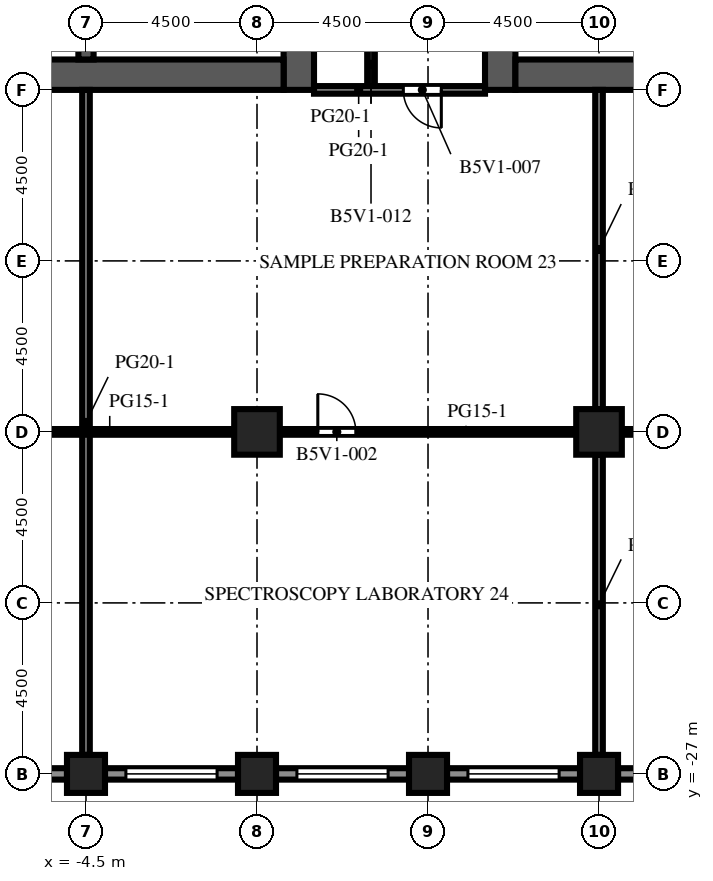
"""IFC4 building model, lengths in metres.
Left out: names, types, materials, properties, quantities, classifications, styles, units other than length and angle.
Written with IfcOpenShell. Run it as: python <this file> out.ifc"""

import sys

from ifc_helpers import new_model, si_unit, direction, frame, frame_2d, origin, origin_2d, place, context, subcontext, project, spatial, rectangle, extrude, element, fill, save


model = new_model("IFC4")
c1 = context("Model", 3, precision=1e-05, world=origin(), true_north=direction((0.0, 1.0)))
c2 = subcontext(c1, "Body", "Model", "MODEL_VIEW")
j1 = project(units=[si_unit("LENGTHUNIT", "METRE"), si_unit("PLANEANGLEUNIT", "RADIAN")], contexts=[c1])
p1 = place(None, origin())
s1 = spatial("IfcSite", under=j1, at=p1, CompositionType="ELEMENT")
p2 = place(p1, origin())
s2 = spatial("IfcBuilding", under=s1, at=p2, CompositionType="ELEMENT")
p3 = place(p2, frame((0.0, 0.0, 173.2)))
s3 = spatial("IfcBuildingStorey", under=s2, at=p3, CompositionType="ELEMENT", Elevation=173.2)
for number, where, z_axis, x_axis in (
    (1, (-4.5, -27.0, 0.0), (0.0, 0.0, 1.0), (1.0, 0.0, 0.0)),
    (2, (0.0, -27.0, 0.0), (0.0, 0.0, 1.0), (1.0, 0.0, 0.0)),
    (3, (4.5, -27.0, 0.0), (0.0, 0.0, 1.0), (1.0, 0.0, 0.0)),
    (4, (9.0, -27.0, 0.0), (0.0, 0.0, 1.0), (1.0, 0.0, 0.0)),
):
    element("IfcColumn", number, at=place(p3, frame(where, z_axis=z_axis, x_axis=x_axis)), inside=s3, PredefinedType="COLUMN", context=c2, shape_type="SweptSolid", body=[
        extrude(rectangle(XDim=1.0, YDim=1.0, at=origin_2d()), origin(), (0.0, 0.0, 1.0), 4.1),
    ])
for number, where, z_axis, x_axis in (
    (5, (0.0, -18.0, 0.0), (0.0, 0.0, 1.0), (1.0, 0.0, 0.0)),
    (6, (9.0, -18.0, 0.0), (0.0, 0.0, 1.0), (1.0, 0.0, 0.0)),
):
    element("IfcColumn", number, at=place(p3, frame(where, z_axis=z_axis, x_axis=x_axis)), inside=s3, PredefinedType="COLUMN", context=c2, shape_type="SweptSolid", body=[
        extrude(rectangle(XDim=1.2, YDim=1.2, at=origin_2d()), origin(), (0.0, 0.0, 1.0), 4.1),
    ])
p4 = place(p3, frame((1.1, -9.0, 0.0), z_axis=(0.0, 0.0, 1.0), x_axis=(0.0, 1.0, 0.0)))
e7 = element("IfcWall", 7, at=p4, inside=s3, PredefinedType="SHEAR", context=c2, shape_type="SweptSolid", body=[
    extrude(rectangle(XDim=27.5, YDim=0.8, at=frame_2d((13.75, 0.0))), origin(), (0.0, 0.0, 1.0), 4.1),
])
p5 = place(p4, frame((12.55, 0.0, 0.0)))
e8 = element("IfcOpeningElement", 8, at=p5, cuts=e7, PredefinedType="OPENING", context=c2, shape_type="SweptSolid", body=[
    extrude(rectangle(XDim=2.4, YDim=2.4, at=frame_2d((1.2, 1.2))), frame((0.0, 0.41, 0.0), z_axis=(0.0, -1.0, 0.0), x_axis=(1.0, 0.0, 0.0)), (0.0, 0.0, 1.0), 0.82),
])
p6 = place(p4, frame((3.95, 0.0, 0.0)))
e9 = element("IfcOpeningElement", 9, at=p6, cuts=e7, PredefinedType="OPENING", context=c2, shape_type="SweptSolid", body=[
    extrude(rectangle(XDim=1.2, YDim=2.1, at=frame_2d((0.6, 1.05))), frame((0.0, 0.41, 0.0), z_axis=(0.0, -1.0, 0.0), x_axis=(1.0, 0.0, 0.0)), (0.0, 0.0, 1.0), 0.82),
])
p7 = place(p4, frame((22.35, 0.0, 0.0)))
e10 = element("IfcOpeningElement", 10, at=p7, cuts=e7, PredefinedType="OPENING", context=c2, shape_type="SweptSolid", body=[
    extrude(rectangle(XDim=1.2, YDim=2.1, at=frame_2d((0.6, 1.05))), frame((0.0, 0.41, 0.0), z_axis=(0.0, -1.0, 0.0), x_axis=(1.0, 0.0, 0.0)), (0.0, 0.0, 1.0), 0.82),
])
p8 = place(p3, frame((-9.7, -8.6, 0.0), z_axis=(0.0, 0.0, 1.0), x_axis=(1.0, 0.0, 0.0)))
e11 = element("IfcWall", 11, at=p8, inside=s3, PredefinedType="SHEAR", context=c2, shape_type="SweptSolid", body=[
    extrude(rectangle(XDim=10.4, YDim=0.8, at=frame_2d((5.2, 0.0))), origin(), (0.0, 0.0, 1.0), 4.1),
])
p9 = place(p3, frame((-4.5, -8.2, 0.0), z_axis=(0.0, 0.0, 1.0), x_axis=(0.0, 1.0, 0.0)))
e12 = element("IfcWall", 12, at=p9, inside=s3, PredefinedType="SHEAR", context=c2, shape_type="SweptSolid", body=[
    extrude(rectangle(XDim=7.5, YDim=0.4, at=frame_2d((3.75, 0.0))), origin(), (0.0, 0.0, 1.0), 4.1),
])
p10 = place(p3, frame((6.4, -9.0, 0.0), z_axis=(0.0, 0.0, 1.0), x_axis=(0.0, 1.0, 0.0)))
e13 = element("IfcWall", 13, at=p10, inside=s3, PredefinedType="SHEAR", context=c2, shape_type="SweptSolid", body=[
    extrude(rectangle(XDim=27.5, YDim=0.8, at=frame_2d((13.75, 0.0))), origin(), (0.0, 0.0, 1.0), 4.1),
])
p11 = place(p10, frame((12.55, 0.0, 0.0)))
e14 = element("IfcOpeningElement", 14, at=p11, cuts=e13, PredefinedType="OPENING", context=c2, shape_type="SweptSolid", body=[
    extrude(rectangle(XDim=2.4, YDim=2.4, at=frame_2d((1.2, 1.2))), frame((0.0, 0.41, 0.0), z_axis=(0.0, -1.0, 0.0), x_axis=(1.0, 0.0, 0.0)), (0.0, 0.0, 1.0), 0.82),
])
p12 = place(p10, frame((3.95, 0.0, 0.0)))
e15 = element("IfcOpeningElement", 15, at=p12, cuts=e13, PredefinedType="OPENING", context=c2, shape_type="SweptSolid", body=[
    extrude(rectangle(XDim=1.2, YDim=2.1, at=frame_2d((0.6, 1.05))), frame((0.0, 0.41, 0.0), z_axis=(0.0, -1.0, 0.0), x_axis=(1.0, 0.0, 0.0)), (0.0, 0.0, 1.0), 0.82),
])
p13 = place(p10, frame((22.35, 0.0, 0.0)))
e16 = element("IfcOpeningElement", 16, at=p13, cuts=e13, PredefinedType="OPENING", context=c2, shape_type="SweptSolid", body=[
    extrude(rectangle(XDim=1.2, YDim=2.1, at=frame_2d((0.6, 1.05))), frame((0.0, 0.41, 0.0), z_axis=(0.0, -1.0, 0.0), x_axis=(1.0, 0.0, 0.0)), (0.0, 0.0, 1.0), 0.82),
])
p14 = place(p3, frame((6.8, -8.6, 0.0), z_axis=(0.0, 0.0, 1.0), x_axis=(1.0, 0.0, 0.0)))
e17 = element("IfcWall", 17, at=p14, inside=s3, PredefinedType="SHEAR", context=c2, shape_type="SweptSolid", body=[
    extrude(rectangle(XDim=10.4, YDim=0.8, at=frame_2d((5.2, 0.0))), origin(), (0.0, 0.0, 1.0), 4.1),
])
p15 = place(p3, frame((-5.0, -27.0, 0.0), z_axis=(0.0, 0.0, 1.0), x_axis=(-1.0, 0.0, 0.0)))
e18 = element("IfcWall", 18, at=p15, inside=s3, PredefinedType="SOLIDWALL", context=c2, shape_type="SweptSolid", body=[
    extrude(rectangle(XDim=3.5, YDim=0.3, at=frame_2d((1.75, 0.0))), origin(), (0.0, 0.0, 1.0), 2.85),
])
p16 = place(p15, frame((0.55, 0.0, 0.8)))
e19 = element("IfcOpeningElement", 19, at=p16, cuts=e18, PredefinedType="OPENING", context=c2, shape_type="SweptSolid", body=[
    extrude(rectangle(XDim=2.4, YDim=1.7, at=frame_2d((1.2, 0.85))), frame((0.0, 0.16, 0.0), z_axis=(0.0, -1.0, 0.0), x_axis=(1.0, 0.0, 0.0)), (0.0, 0.0, 1.0), 0.32),
])
p17 = place(p3, frame((-0.5, -27.0, 0.0), z_axis=(0.0, 0.0, 1.0), x_axis=(-1.0, 0.0, 0.0)))
e20 = element("IfcWall", 20, at=p17, inside=s3, PredefinedType="SOLIDWALL", context=c2, shape_type="SweptSolid", body=[
    extrude(rectangle(XDim=3.5, YDim=0.3, at=frame_2d((1.75, 0.0))), origin(), (0.0, 0.0, 1.0), 2.85),
])
p18 = place(p17, frame((0.55, 0.0, 0.8)))
e21 = element("IfcOpeningElement", 21, at=p18, cuts=e20, PredefinedType="OPENING", context=c2, shape_type="SweptSolid", body=[
    extrude(rectangle(XDim=2.4, YDim=1.7, at=frame_2d((1.2, 0.85))), frame((0.0, 0.16, 0.0), z_axis=(0.0, -1.0, 0.0), x_axis=(1.0, 0.0, 0.0)), (0.0, 0.0, 1.0), 0.32),
])
p19 = place(p3, frame((4.0, -27.0, 0.0), z_axis=(0.0, 0.0, 1.0), x_axis=(-1.0, 0.0, 0.0)))
e22 = element("IfcWall", 22, at=p19, inside=s3, PredefinedType="SOLIDWALL", context=c2, shape_type="SweptSolid", body=[
    extrude(rectangle(XDim=3.5, YDim=0.3, at=frame_2d((1.75, 0.0))), origin(), (0.0, 0.0, 1.0), 2.85),
])
p20 = place(p19, frame((0.55, 0.0, 0.8)))
e23 = element("IfcOpeningElement", 23, at=p20, cuts=e22, PredefinedType="OPENING", context=c2, shape_type="SweptSolid", body=[
    extrude(rectangle(XDim=2.4, YDim=1.7, at=frame_2d((1.2, 0.85))), frame((0.0, 0.16, 0.0), z_axis=(0.0, -1.0, 0.0), x_axis=(1.0, 0.0, 0.0)), (0.0, 0.0, 1.0), 0.32),
])
p21 = place(p3, frame((8.5, -27.0, 0.0), z_axis=(0.0, 0.0, 1.0), x_axis=(-1.0, 0.0, 0.0)))
e24 = element("IfcWall", 24, at=p21, inside=s3, PredefinedType="SOLIDWALL", context=c2, shape_type="SweptSolid", body=[
    extrude(rectangle(XDim=3.5, YDim=0.3, at=frame_2d((1.75, 0.0))), origin(), (0.0, 0.0, 1.0), 2.85),
])
p22 = place(p21, frame((0.55, 0.0, 0.8)))
e25 = element("IfcOpeningElement", 25, at=p22, cuts=e24, PredefinedType="OPENING", context=c2, shape_type="SweptSolid", body=[
    extrude(rectangle(XDim=2.4, YDim=1.7, at=frame_2d((1.2, 0.85))), frame((0.0, 0.16, 0.0), z_axis=(0.0, -1.0, 0.0), x_axis=(1.0, 0.0, 0.0)), (0.0, 0.0, 1.0), 0.32),
])
p23 = place(p3, frame((13.0, -27.0, 0.0), z_axis=(0.0, 0.0, 1.0), x_axis=(-1.0, 0.0, 0.0)))
e26 = element("IfcWall", 26, at=p23, inside=s3, PredefinedType="SOLIDWALL", context=c2, shape_type="SweptSolid", body=[
    extrude(rectangle(XDim=3.5, YDim=0.3, at=frame_2d((1.75, 0.0))), origin(), (0.0, 0.0, 1.0), 2.85),
])
p24 = place(p23, frame((0.55, 0.0, 0.8)))
e27 = element("IfcOpeningElement", 27, at=p24, cuts=e26, PredefinedType="OPENING", context=c2, shape_type="SweptSolid", body=[
    extrude(rectangle(XDim=2.4, YDim=1.7, at=frame_2d((1.2, 0.85))), frame((0.0, 0.16, 0.0), z_axis=(0.0, -1.0, 0.0), x_axis=(1.0, 0.0, 0.0)), (0.0, 0.0, 1.0), 0.32),
])
p25 = place(p3, frame((-0.8, -8.2, 0.0), z_axis=(0.0, 0.0, 1.0), x_axis=(0.0, 1.0, 0.0)))
e28 = element("IfcWall", 28, at=p25, inside=s3, PredefinedType="PARTITIONING", context=c2, shape_type="SweptSolid", body=[
    extrude(rectangle(XDim=2.55, YDim=0.1, at=frame_2d((1.275, 0.0))), origin(), (0.0, 0.0, 1.0), 3.65),
])
p26 = place(p25, frame((0.775, 0.0, 0.0)))
e29 = element("IfcOpeningElement", 29, at=p26, cuts=e28, PredefinedType="OPENING", context=c2, shape_type="SweptSolid", body=[
    extrude(rectangle(XDim=1.0, YDim=2.1, at=frame_2d((0.5, 1.05))), frame((0.0, 0.06, 0.0), z_axis=(0.0, -1.0, 0.0), x_axis=(1.0, 0.0, 0.0)), (0.0, 0.0, 1.0), 0.12),
])
p27 = place(p3, frame((8.3, -8.2, 0.0), z_axis=(0.0, 0.0, 1.0), x_axis=(0.0, 1.0, 0.0)))
e30 = element("IfcWall", 30, at=p27, inside=s3, PredefinedType="PARTITIONING", context=c2, shape_type="SweptSolid", body=[
    extrude(rectangle(XDim=2.55, YDim=0.1, at=frame_2d((1.275, 0.0))), origin(), (0.0, 0.0, 1.0), 3.65),
])
p28 = place(p27, frame((0.775, 0.0, 0.0)))
e31 = element("IfcOpeningElement", 31, at=p28, cuts=e30, PredefinedType="OPENING", context=c2, shape_type="SweptSolid", body=[
    extrude(rectangle(XDim=1.0, YDim=2.1, at=frame_2d((0.5, 1.05))), frame((0.0, 0.06, 0.0), z_axis=(0.0, -1.0, 0.0), x_axis=(1.0, 0.0, 0.0)), (0.0, 0.0, 1.0), 0.12),
])
p29 = place(p3, frame((-4.5, -26.5, 0.0), z_axis=(0.0, 0.0, 1.0), x_axis=(0.0, 1.0, 0.0)))
e32 = element("IfcWall", 32, at=p29, inside=s3, PredefinedType="PARTITIONING", context=c2, shape_type="SweptSolid", body=[
    extrude(rectangle(XDim=17.5, YDim=0.2, at=frame_2d((8.75, 0.0))), origin(), (0.0, 0.0, 1.0), 3.65),
])
p30 = place(p3, frame((3.0, -9.0, 0.0), z_axis=(0.0, 0.0, 1.0), x_axis=(0.0, 1.0, 0.0)))
e33 = element("IfcWall", 33, at=p30, inside=s3, PredefinedType="PARTITIONING", context=c2, shape_type="SweptSolid", body=[
    extrude(rectangle(XDim=3.0, YDim=0.2, at=frame_2d((1.5, 0.0))), origin(), (0.0, 0.0, 1.0), 3.65),
])
p31 = place(p30, frame((1.35, 0.0, 0.0)))
e34 = element("IfcOpeningElement", 34, at=p31, cuts=e33, PredefinedType="OPENING", context=c2, shape_type="SweptSolid", body=[
    extrude(rectangle(XDim=1.0, YDim=2.1, at=frame_2d((0.5, 1.05))), frame((0.0, 0.11, 0.0), z_axis=(0.0, -1.0, 0.0), x_axis=(1.0, 0.0, 0.0)), (0.0, 0.0, 1.0), 0.22),
])
p32 = place(p3, frame((9.0, -26.5, 0.0), z_axis=(0.0, 0.0, 1.0), x_axis=(0.0, 1.0, 0.0)))
e35 = element("IfcWall", 35, at=p32, inside=s3, PredefinedType="PARTITIONING", context=c2, shape_type="SweptSolid", body=[
    extrude(rectangle(XDim=7.9, YDim=0.2, at=frame_2d((3.95, 0.0))), origin(), (0.0, 0.0, 1.0), 3.65),
])
p33 = place(p3, frame((9.0, -17.4, 0.0), z_axis=(0.0, 0.0, 1.0), x_axis=(0.0, 1.0, 0.0)))
e36 = element("IfcWall", 36, at=p33, inside=s3, PredefinedType="PARTITIONING", context=c2, shape_type="SweptSolid", body=[
    extrude(rectangle(XDim=8.4, YDim=0.2, at=frame_2d((4.2, 0.0))), origin(), (0.0, 0.0, 1.0), 3.65),
])
p34 = place(p3, frame((-0.6, -18.0, 0.0), z_axis=(0.0, 0.0, 1.0), x_axis=(-1.0, 0.0, 0.0)))
e37 = element("IfcWall", 37, at=p34, inside=s3, PredefinedType="PARTITIONING", context=c2, shape_type="SweptSolid", body=[
    extrude(rectangle(XDim=7.8, YDim=0.15, at=frame_2d((3.9, 0.0))), origin(), (0.0, 0.0, 1.0), 3.65),
])
p35 = place(p34, frame((6.55, 0.0, 0.0)))
e38 = element("IfcOpeningElement", 38, at=p35, cuts=e37, PredefinedType="OPENING", context=c2, shape_type="SweptSolid", body=[
    extrude(rectangle(XDim=1.0, YDim=2.1, at=frame_2d((0.5, 1.05))), frame((0.0, 0.085, 0.0), z_axis=(0.0, -1.0, 0.0), x_axis=(1.0, 0.0, 0.0)), (0.0, 0.0, 1.0), 0.17),
])
p36 = place(p3, frame((8.4, -18.0, 0.0), z_axis=(0.0, 0.0, 1.0), x_axis=(-1.0, 0.0, 0.0)))
e39 = element("IfcWall", 39, at=p36, inside=s3, PredefinedType="PARTITIONING", context=c2, shape_type="SweptSolid", body=[
    extrude(rectangle(XDim=7.8, YDim=0.15, at=frame_2d((3.9, 0.0))), origin(), (0.0, 0.0, 1.0), 3.65),
])
p37 = place(p36, frame((5.8, 0.0, 0.0)))
e40 = element("IfcOpeningElement", 40, at=p37, cuts=e39, PredefinedType="OPENING", context=c2, shape_type="SweptSolid", body=[
    extrude(rectangle(XDim=1.0, YDim=2.1, at=frame_2d((0.5, 1.05))), frame((0.0, 0.085, 0.0), z_axis=(0.0, -1.0, 0.0), x_axis=(1.0, 0.0, 0.0)), (0.0, 0.0, 1.0), 0.17),
])
p38 = place(p3, frame((17.4, -18.0, 0.0), z_axis=(0.0, 0.0, 1.0), x_axis=(-1.0, 0.0, 0.0)))
e41 = element("IfcWall", 41, at=p38, inside=s3, PredefinedType="PARTITIONING", context=c2, shape_type="SweptSolid", body=[
    extrude(rectangle(XDim=7.8, YDim=0.15, at=frame_2d((3.9, 0.0))), origin(), (0.0, 0.0, 1.0), 3.65),
])
p39 = place(p38, frame((0.55, 0.0, 0.0)))
e42 = element("IfcOpeningElement", 42, at=p39, cuts=e41, PredefinedType="OPENING", context=c2, shape_type="SweptSolid", body=[
    extrude(rectangle(XDim=1.0, YDim=2.1, at=frame_2d((0.5, 1.05))), frame((0.0, 0.085, 0.0), z_axis=(0.0, -1.0, 0.0), x_axis=(1.0, 0.0, 0.0)), (0.0, 0.0, 1.0), 0.17),
])
p40 = place(p3, frame((6.0, -9.0, 0.0), z_axis=(0.0, 0.0, 1.0), x_axis=(-1.0, 0.0, 0.0)))
e43 = element("IfcWall", 43, at=p40, inside=s3, PredefinedType="PARTITIONING", context=c2, shape_type="SweptSolid", body=[
    extrude(rectangle(XDim=4.5, YDim=0.2, at=frame_2d((2.25, 0.0))), origin(), (0.0, 0.0, 1.0), 3.65),
])
p41 = place(p40, frame((1.15, 0.0, 0.0)))
e44 = element("IfcOpeningElement", 44, at=p41, cuts=e43, PredefinedType="OPENING", context=c2, shape_type="SweptSolid", body=[
    extrude(rectangle(XDim=1.0, YDim=2.1, at=frame_2d((0.5, 1.05))), frame((0.0, 0.11, 0.0), z_axis=(0.0, -1.0, 0.0), x_axis=(1.0, 0.0, 0.0)), (0.0, 0.0, 1.0), 0.22),
])
p42 = place(p18, origin())
e45 = element("IfcWindow", 45, at=p42, inside=s3, PartitioningType="SINGLE_PANEL", PredefinedType="WINDOW", context=c2, shape_type="SweptSolid", body=[
    extrude(rectangle(XDim=2.4, YDim=1.7, at=frame_2d((1.2, 0.85))), frame((0.0, 0.03, 0.0), z_axis=(0.0, -1.0, 0.0), x_axis=(1.0, 0.0, 0.0)), (0.0, 0.0, 1.0), 0.06),
])
fill(e21, e45)
p43 = place(p20, origin())
e46 = element("IfcWindow", 46, at=p43, inside=s3, PartitioningType="SINGLE_PANEL", PredefinedType="WINDOW", context=c2, shape_type="SweptSolid", body=[
    extrude(rectangle(XDim=2.4, YDim=1.7, at=frame_2d((1.2, 0.85))), frame((0.0, 0.03, 0.0), z_axis=(0.0, -1.0, 0.0), x_axis=(1.0, 0.0, 0.0)), (0.0, 0.0, 1.0), 0.06),
])
fill(e23, e46)
p44 = place(p22, origin())
e47 = element("IfcWindow", 47, at=p44, inside=s3, PartitioningType="SINGLE_PANEL", PredefinedType="WINDOW", context=c2, shape_type="SweptSolid", body=[
    extrude(rectangle(XDim=2.4, YDim=1.7, at=frame_2d((1.2, 0.85))), frame((0.0, 0.03, 0.0), z_axis=(0.0, -1.0, 0.0), x_axis=(1.0, 0.0, 0.0)), (0.0, 0.0, 1.0), 0.06),
])
fill(e25, e47)
p45 = place(p37, origin())
e48 = element("IfcDoor", 48, at=p45, inside=s3, OperationType="SINGLE_SWING_RIGHT", PredefinedType="DOOR", context=c2, shape_type="SweptSolid", body=[
    extrude(rectangle(XDim=1.0, YDim=2.1, at=frame_2d((0.5, 1.05))), frame((0.0, 0.025, 0.0), z_axis=(0.0, -1.0, 0.0), x_axis=(1.0, 0.0, 0.0)), (0.0, 0.0, 1.0), 0.05),
])
fill(e40, e48)
p46 = place(p41, origin())
e49 = element("IfcDoor", 49, at=p46, inside=s3, OperationType="SINGLE_SWING_LEFT", PredefinedType="DOOR", context=c2, shape_type="SweptSolid", body=[
    extrude(rectangle(XDim=1.0, YDim=2.1, at=frame_2d((0.5, 1.05))), frame((0.0, 0.025, 0.0), z_axis=(0.0, -1.0, 0.0), x_axis=(1.0, 0.0, 0.0)), (0.0, 0.0, 1.0), 0.05),
])
fill(e44, e49)
save(model, sys.argv[1])
